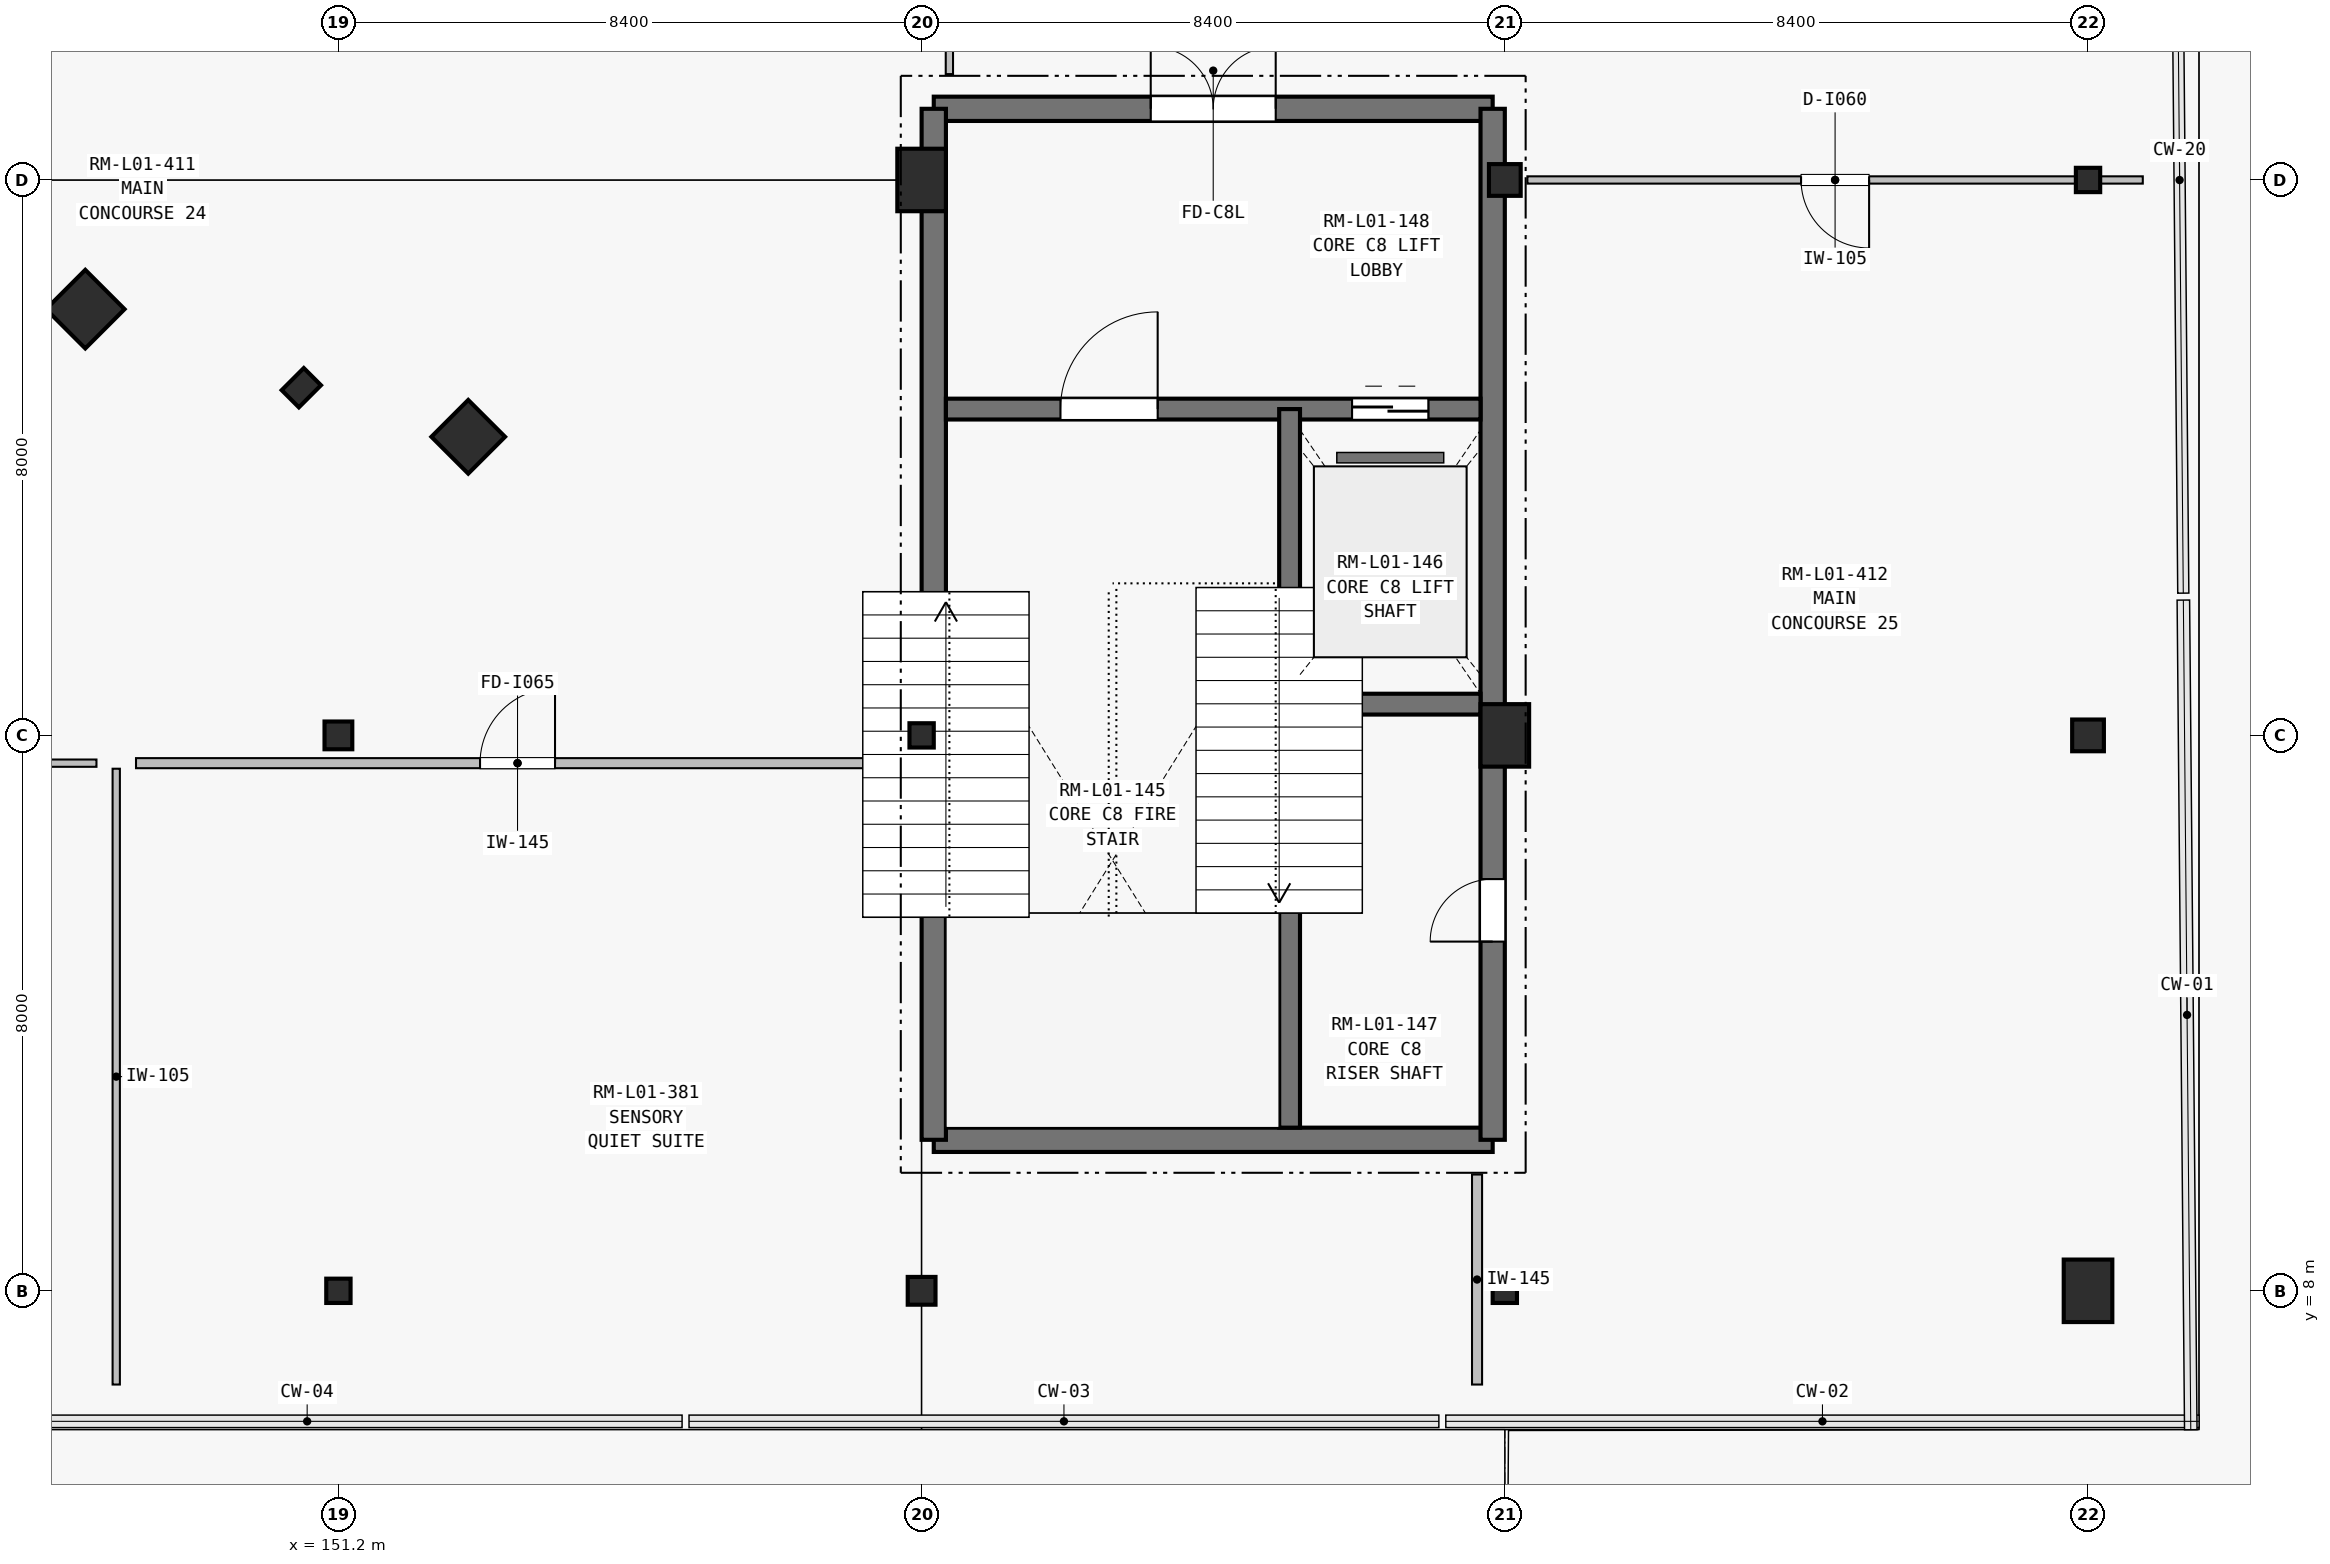
"""IFC4 building model, lengths in metres.
Left out: names, types, materials, properties, quantities, classifications, styles, units other than length and angle.
Written with IfcOpenShell. Run it as: python <this file> out.ifc"""

import sys

from ifc_helpers import new_model, si_unit, direction, frame, frame_2d, origin, origin_2d, place, context, subcontext, project, spatial, rectangle, hollow_rectangle, hollow_circle, i_section, extrude, element, fill, save


model = new_model("IFC4")
c1 = context("Model", 3, precision=1e-05, world=origin(), true_north=direction((0.0, 1.0)))
c2 = subcontext(c1, "Body", "Model", "MODEL_VIEW")
j1 = project(units=[si_unit("LENGTHUNIT", "METRE"), si_unit("PLANEANGLEUNIT", "RADIAN")], contexts=[c1])
p1 = place(None, origin())
s1 = spatial("IfcSite", under=j1, at=p1, CompositionType="ELEMENT")
p2 = place(p1, origin())
s2 = spatial("IfcBuilding", under=s1, at=p2, CompositionType="ELEMENT")
p3 = place(p2, frame((0.0, 0.0, 5.4)))
s3 = spatial("IfcBuildingStorey", under=s2, at=p3, CompositionType="ELEMENT", Elevation=5.4)
p4 = place(p3, frame((147.554, 22.139, 0.0), z_axis=(0.0, 0.0, 1.0), x_axis=(0.707106781187, -0.707106781187, 0.0)))
e1 = element("IfcColumn", 1, at=p4, inside=s3, PredefinedType="COLUMN", context=c2, shape_type="SweptSolid", body=[
    extrude(rectangle(XDim=0.8, YDim=0.8, at=origin_2d()), origin(), (0.0, 0.0, 1.0), 4.5),
])
p5 = place(p3, frame((153.07, 20.301, 0.0), z_axis=(0.0, 0.0, 1.0), x_axis=(0.707106781187, -0.707106781187, 0.0)))
e2 = element("IfcColumn", 2, at=p5, inside=s3, PredefinedType="COLUMN", context=c2, shape_type="SweptSolid", body=[
    extrude(rectangle(XDim=0.75, YDim=0.75, at=origin_2d()), origin(), (0.0, 0.0, 1.0), 4.2),
])
p6 = place(p3, frame((151.2, 8.0, 0.0), z_axis=(0.0, 0.0, 1.0), x_axis=(1.0, 0.0, 0.0)))
e3 = element("IfcColumn", 3, at=p6, inside=s3, PredefinedType="COLUMN", context=c2, shape_type="SweptSolid", body=[
    extrude(hollow_rectangle(XDim=0.35, YDim=0.35, WallThickness=0.016, at=origin_2d()), origin(), (0.0, 0.0, 1.0), 4.5),
])
for number, where, z_axis, x_axis in (
    (4, (151.2, 16.0, 0.0), (0.0, 0.0, 1.0), (1.0, 0.0, 0.0)),
    (5, (159.6, 8.0, 0.0), (0.0, 0.0, 1.0), (1.0, 0.0, 0.0)),
):
    element("IfcColumn", number, at=place(p3, frame(where, z_axis=z_axis, x_axis=x_axis)), inside=s3, PredefinedType="COLUMN", context=c2, shape_type="SweptSolid", body=[
        extrude(i_section(OverallWidth=0.4, OverallDepth=0.4, WebThickness=0.016, FlangeThickness=0.028, at=origin_2d()), origin(), (0.0, 0.0, 1.0), 4.5),
    ])
p7 = place(p3, frame((159.6, 16.0, 0.0), z_axis=(0.0, 0.0, 1.0), x_axis=(1.0, 0.0, 0.0)))
e6 = element("IfcColumn", 6, at=p7, inside=s3, PredefinedType="COLUMN", context=c2, shape_type="SweptSolid", body=[
    extrude(i_section(OverallWidth=0.35, OverallDepth=0.35, WebThickness=0.014, FlangeThickness=0.024, at=origin_2d()), origin(), (0.0, 0.0, 1.0), 4.5),
])
p8 = place(p3, frame((159.6, 24.0, 0.0), z_axis=(0.0, 0.0, 1.0), x_axis=(1.0, 0.0, 0.0)))
e7 = element("IfcColumn", 7, at=p8, inside=s3, PredefinedType="COLUMN", context=c2, shape_type="SweptSolid", body=[
    extrude(rectangle(XDim=0.7, YDim=0.9, at=origin_2d()), origin(), (0.0, 0.0, 1.0), 4.5),
])
p9 = place(p3, frame((168.0, 8.0, 0.0), z_axis=(0.0, 0.0, 1.0), x_axis=(1.0, 0.0, 0.0)))
e8 = element("IfcColumn", 8, at=p9, inside=s3, PredefinedType="COLUMN", context=c2, shape_type="SweptSolid", body=[
    extrude(i_section(OverallWidth=0.35, OverallDepth=0.35, WebThickness=0.014, FlangeThickness=0.024, at=origin_2d()), origin(), (0.0, 0.0, 1.0), 4.5),
])
p10 = place(p3, frame((168.0, 16.0, 0.0), z_axis=(0.0, 0.0, 1.0), x_axis=(1.0, 0.0, 0.0)))
e9 = element("IfcColumn", 9, at=p10, inside=s3, PredefinedType="COLUMN", context=c2, shape_type="SweptSolid", body=[
    extrude(rectangle(XDim=0.7, YDim=0.9, at=origin_2d()), origin(), (0.0, 0.0, 1.0), 4.5),
])
p11 = place(p3, frame((168.0, 24.0, 0.0), z_axis=(0.0, 0.0, 1.0), x_axis=(1.0, 0.0, 0.0)))
e10 = element("IfcColumn", 10, at=p11, inside=s3, PredefinedType="COLUMN", context=c2, shape_type="SweptSolid", body=[
    extrude(hollow_circle(Radius=0.229, WallThickness=0.016, at=origin_2d()), origin(), (0.0, 0.0, 1.0), 4.5),
])
p12 = place(p3, frame((176.4, 8.0, 0.0), z_axis=(0.0, 0.0, 1.0), x_axis=(1.0, 0.0, 0.0)))
e11 = element("IfcColumn", 11, at=p12, inside=s3, PredefinedType="COLUMN", context=c2, shape_type="SweptSolid", body=[
    extrude(rectangle(XDim=0.7, YDim=0.9, at=origin_2d()), origin(), (0.0, 0.0, 1.0), 4.26),
])
p13 = place(p3, frame((176.4, 16.0, 0.0), z_axis=(0.0, 0.0, 1.0), x_axis=(1.0, 0.0, 0.0)))
e12 = element("IfcColumn", 12, at=p13, inside=s3, PredefinedType="COLUMN", context=c2, shape_type="SweptSolid", body=[
    extrude(hollow_circle(Radius=0.229, WallThickness=0.016, at=origin_2d()), origin(), (0.0, 0.0, 1.0), 4.26),
])
p14 = place(p3, frame((176.4, 24.0, 0.0), z_axis=(0.0, 0.0, 1.0), x_axis=(1.0, 0.0, 0.0)))
e13 = element("IfcColumn", 13, at=p14, inside=s3, PredefinedType="COLUMN", context=c2, shape_type="SweptSolid", body=[
    extrude(hollow_rectangle(XDim=0.35, YDim=0.35, WallThickness=0.016, at=origin_2d()), origin(), (0.0, 0.0, 1.0), 4.26),
])
p15 = place(p3, frame((150.666, 21.008, 0.0), z_axis=(0.0, 0.0, 1.0), x_axis=(0.707106781187, -0.707106781187, 0.0)))
e14 = element("IfcColumn", 14, at=p15, inside=s3, PredefinedType="PILASTER", context=c2, shape_type="SweptSolid", body=[
    extrude(rectangle(XDim=0.35, YDim=0.45, at=origin_2d()), origin(), (0.0, 0.0, 1.0), 4.5),
])
p16 = place(p3, frame((159.775, 10.175, 0.0), z_axis=(0.0, 0.0, 1.0), x_axis=(1.0, 0.0, 0.0)))
e15 = element("IfcWall", 15, at=p16, inside=s3, PredefinedType="SHEAR", context=c2, shape_type="SweptSolid", body=[
    extrude(rectangle(XDim=8.05, YDim=0.35, at=frame_2d((4.025, 0.0))), origin(), (0.0, 0.0, 1.0), 4.5),
])
p17 = place(p3, frame((159.775, 25.025, 0.0), z_axis=(0.0, 0.0, 1.0), x_axis=(1.0, 0.0, 0.0)))
e16 = element("IfcWall", 16, at=p17, inside=s3, PredefinedType="SHEAR", context=c2, shape_type="SweptSolid", body=[
    extrude(rectangle(XDim=8.05, YDim=0.35, at=frame_2d((4.025, 0.0))), origin(), (0.0, 0.0, 1.0), 4.5),
])
p18 = place(p17, frame((3.125, 0.0, 0.0)))
e17 = element("IfcOpeningElement", 17, at=p18, cuts=e16, PredefinedType="OPENING", context=c2, shape_type="SweptSolid", body=[
    extrude(rectangle(XDim=1.8, YDim=2.25, at=frame_2d((0.9, 1.125))), frame((0.0, 0.185, 0.0), z_axis=(0.0, -1.0, 0.0), x_axis=(1.0, 0.0, 0.0)), (0.0, 0.0, 1.0), 0.37),
])
p19 = place(p3, frame((159.775, 10.175, 0.0), z_axis=(0.0, 0.0, 1.0), x_axis=(0.0, 1.0, 0.0)))
e18 = element("IfcWall", 18, at=p19, inside=s3, PredefinedType="SHEAR", context=c2, shape_type="SweptSolid", body=[
    extrude(rectangle(XDim=14.85, YDim=0.35, at=frame_2d((7.425, 0.0))), origin(), (0.0, 0.0, 1.0), 4.5),
])
p20 = place(p3, frame((167.825, 10.175, 0.0), z_axis=(0.0, 0.0, 1.0), x_axis=(0.0, 1.0, 0.0)))
e19 = element("IfcWall", 19, at=p20, inside=s3, PredefinedType="SHEAR", context=c2, shape_type="SweptSolid", body=[
    extrude(rectangle(XDim=14.85, YDim=0.35, at=frame_2d((7.425, 0.0))), origin(), (0.0, 0.0, 1.0), 4.5),
])
p21 = place(p20, frame((2.855, 0.0, 0.0)))
e20 = element("IfcOpeningElement", 20, at=p21, cuts=e19, PredefinedType="OPENING", context=c2, shape_type="SweptSolid", body=[
    extrude(rectangle(XDim=0.9, YDim=2.1, at=frame_2d((0.45, 1.05))), frame((0.0, 0.185, 0.0), z_axis=(0.0, -1.0, 0.0), x_axis=(1.0, 0.0, 0.0)), (0.0, 0.0, 1.0), 0.37),
])
p22 = place(p3, frame((159.95, 20.7, 0.0), z_axis=(0.0, 0.0, 1.0), x_axis=(1.0, 0.0, 0.0)))
e21 = element("IfcWall", 21, at=p22, inside=s3, PredefinedType="SHEAR", context=c2, shape_type="SweptSolid", body=[
    extrude(rectangle(XDim=7.7, YDim=0.3, at=frame_2d((3.85, 0.0))), origin(), (0.0, 0.0, 1.0), 4.5),
])
p23 = place(p22, frame((1.65, 0.0, 0.0)))
e22 = element("IfcOpeningElement", 22, at=p23, cuts=e21, PredefinedType="OPENING", context=c2, shape_type="SweptSolid", body=[
    extrude(rectangle(XDim=1.4, YDim=2.2, at=frame_2d((0.7, 1.1))), frame((0.0, 0.16, 0.0), z_axis=(0.0, -1.0, 0.0), x_axis=(1.0, 0.0, 0.0)), (0.0, 0.0, 1.0), 0.32),
])
p24 = place(p22, frame((5.85, 0.0, 0.0)))
e23 = element("IfcOpeningElement", 23, at=p24, cuts=e21, PredefinedType="OPENING", context=c2, shape_type="SweptSolid", body=[
    extrude(rectangle(XDim=1.1, YDim=2.2, at=frame_2d((0.55, 1.1))), frame((0.0, 0.16, 0.0), z_axis=(0.0, -1.0, 0.0), x_axis=(1.0, 0.0, 0.0)), (0.0, 0.0, 1.0), 0.32),
])
p25 = place(p3, frame((164.9, 10.35, 0.0), z_axis=(0.0, 0.0, 1.0), x_axis=(0.0, 1.0, 0.0)))
e24 = element("IfcWall", 24, at=p25, inside=s3, PredefinedType="SHEAR", context=c2, shape_type="SweptSolid", body=[
    extrude(rectangle(XDim=10.35, YDim=0.3, at=frame_2d((5.175, 0.0))), origin(), (0.0, 0.0, 1.0), 4.5),
])
p26 = place(p3, frame((165.05, 16.45, 0.0), z_axis=(0.0, 0.0, 1.0), x_axis=(1.0, 0.0, 0.0)))
e25 = element("IfcWall", 25, at=p26, inside=s3, PredefinedType="SHEAR", context=c2, shape_type="SweptSolid", body=[
    extrude(rectangle(XDim=2.6, YDim=0.3, at=frame_2d((1.3, 0.0))), origin(), (0.0, 0.0, 1.0), 4.5),
])
p27 = place(p3, frame((177.189, 24.0, 0.0), z_axis=(0.0, 0.0, 1.0), x_axis=(-1.0, 0.0, 0.0)))
e26 = element("IfcWall", 26, at=p27, inside=s3, PredefinedType="PARTITIONING", context=c2, shape_type="SweptSolid", body=[
    extrude(rectangle(XDim=8.864, YDim=0.105, at=frame_2d((4.432, 0.0))), origin(), (0.0, 0.0, 1.0), 3.573),
])
p28 = place(p27, frame((3.942, 0.0, 0.0)))
e27 = element("IfcOpeningElement", 27, at=p28, cuts=e26, PredefinedType="OPENING", context=c2, shape_type="SweptSolid", body=[
    extrude(rectangle(XDim=0.98, YDim=2.15, at=frame_2d((0.49, 1.075))), frame((0.0, 0.062, 0.0), z_axis=(0.0, -1.0, 0.0), x_axis=(1.0, 0.0, 0.0)), (0.0, 0.0, 1.0), 0.125),
])
p29 = place(p3, frame((160.0, 25.525, 0.0), z_axis=(0.0, 0.0, 1.0), x_axis=(0.0, 1.0, 0.0)))
e28 = element("IfcWall", 28, at=p29, inside=s3, PredefinedType="PARTITIONING", context=c2, shape_type="SweptSolid", body=[
    extrude(rectangle(XDim=7.35, YDim=0.105, at=frame_2d((3.675, 0.0))), origin(), (0.0, 0.0, 1.0), 4.2),
])
p30 = place(p3, frame((148.0, 15.52, 0.0), z_axis=(0.0, 0.0, 1.0), x_axis=(0.0, -1.0, 0.0)))
e29 = element("IfcWall", 29, at=p30, inside=s3, PredefinedType="PARTITIONING", context=c2, shape_type="SweptSolid", body=[
    extrude(rectangle(XDim=8.87, YDim=0.105, at=frame_2d((4.435, 0.0))), origin(), (0.0, 0.0, 1.0), 3.475),
])
p31 = place(p3, frame((118.285, 15.6, 0.0), z_axis=(0.0, 0.0, 1.0), x_axis=(1.0, 0.0, 0.0)))
e30 = element("IfcWall", 30, at=p31, inside=s3, PredefinedType="PARTITIONING", context=c2, shape_type="SweptSolid", body=[
    extrude(rectangle(XDim=29.43, YDim=0.105, at=frame_2d((14.715, 0.0))), origin(), (0.0, 0.0, 1.0), 3.475),
])
p32 = place(p31, frame((14.225, 0.0, 0.0)))
e31 = element("IfcOpeningElement", 31, at=p32, cuts=e30, PredefinedType="OPENING", context=c2, shape_type="SweptSolid", body=[
    extrude(rectangle(XDim=0.98, YDim=2.15, at=frame_2d((0.49, 1.075))), frame((0.0, 0.062, 0.0), z_axis=(0.0, -1.0, 0.0), x_axis=(1.0, 0.0, 0.0)), (0.0, 0.0, 1.0), 0.125),
])
p33 = place(p3, frame((167.6, 9.675, 0.0), z_axis=(0.0, 0.0, 1.0), x_axis=(0.0, -1.0, 0.0)))
e32 = element("IfcWall", 32, at=p33, inside=s3, PredefinedType="PARTITIONING", context=c2, shape_type="SweptSolid", body=[
    extrude(rectangle(XDim=3.025, YDim=0.145, at=frame_2d((1.513, 0.0))), origin(), (0.0, 0.0, 1.0), 3.475),
])
p34 = place(p3, frame((148.285, 15.6, 0.0), z_axis=(0.0, 0.0, 1.0), x_axis=(1.0, 0.0, 0.0)))
e33 = element("IfcWall", 33, at=p34, inside=s3, PredefinedType="PARTITIONING", context=c2, shape_type="SweptSolid", body=[
    extrude(rectangle(XDim=10.99, YDim=0.145, at=frame_2d((5.495, 0.0))), origin(), (0.0, 0.0, 1.0), 3.642),
])
p35 = place(p34, frame((4.955, 0.0, 0.0)))
e34 = element("IfcOpeningElement", 34, at=p35, cuts=e33, PredefinedType="OPENING", context=c2, shape_type="SweptSolid", body=[
    extrude(rectangle(XDim=1.08, YDim=2.15, at=frame_2d((0.54, 1.075))), frame((0.0, 0.083, 0.0), z_axis=(0.0, -1.0, 0.0), x_axis=(1.0, 0.0, 0.0)), (0.0, 0.0, 1.0), 0.165),
])
p36 = place(p18, origin())
e35 = element("IfcDoor", 35, at=p36, inside=s3, OperationType="DOUBLE_DOOR_SINGLE_SWING", PredefinedType="DOOR", context=c2, shape_type="SweptSolid", body=[
    extrude(rectangle(XDim=1.8, YDim=2.25, at=frame_2d((0.9, 1.125))), frame((0.0, 0.025, 0.0), z_axis=(0.0, -1.0, 0.0), x_axis=(1.0, 0.0, 0.0)), (0.0, 0.0, 1.0), 0.05),
])
fill(e17, e35)
p37 = place(p23, origin())
e36 = element("IfcDoor", 36, at=p37, inside=s3, OperationType="SINGLE_SWING_RIGHT", PredefinedType="DOOR", context=c2, shape_type="SweptSolid", body=[
    extrude(rectangle(XDim=1.4, YDim=2.2, at=frame_2d((0.7, 1.1))), frame((0.0, 0.025, 0.0), z_axis=(0.0, -1.0, 0.0), x_axis=(1.0, 0.0, 0.0)), (0.0, 0.0, 1.0), 0.05),
])
fill(e22, e36)
p38 = place(p21, origin())
e37 = element("IfcDoor", 37, at=p38, inside=s3, OperationType="SINGLE_SWING_LEFT", PredefinedType="DOOR", context=c2, shape_type="SweptSolid", body=[
    extrude(rectangle(XDim=0.9, YDim=2.1, at=frame_2d((0.45, 1.05))), frame((0.0, 0.025, 0.0), z_axis=(0.0, -1.0, 0.0), x_axis=(1.0, 0.0, 0.0)), (0.0, 0.0, 1.0), 0.05),
])
fill(e20, e37)
p39 = place(p24, origin())
e38 = element("IfcDoor", 38, at=p39, inside=s3, OperationType="SLIDING_TO_LEFT", PredefinedType="DOOR", context=c2, shape_type="SweptSolid", body=[
    extrude(rectangle(XDim=1.1, YDim=2.2, at=frame_2d((0.55, 1.1))), frame((0.0, 0.025, 0.0), z_axis=(0.0, -1.0, 0.0), x_axis=(1.0, 0.0, 0.0)), (0.0, 0.0, 1.0), 0.05),
])
fill(e23, e38)
p40 = place(p28, origin())
e39 = element("IfcDoor", 39, at=p40, inside=s3, OperationType="SINGLE_SWING_LEFT", PredefinedType="DOOR", context=c2, shape_type="SweptSolid", body=[
    extrude(rectangle(XDim=0.98, YDim=2.15, at=frame_2d((0.49, 1.075))), frame((0.0, 0.025, 0.0), z_axis=(0.0, -1.0, 0.0), x_axis=(1.0, 0.0, 0.0)), (0.0, 0.0, 1.0), 0.05),
])
fill(e27, e39)
p41 = place(p35, origin())
e40 = element("IfcDoor", 40, at=p41, inside=s3, OperationType="SINGLE_SWING_RIGHT", PredefinedType="DOOR", context=c2, shape_type="SweptSolid", body=[
    extrude(rectangle(XDim=1.08, YDim=2.15, at=frame_2d((0.54, 1.075))), frame((0.0, 0.025, 0.0), z_axis=(0.0, -1.0, 0.0), x_axis=(1.0, 0.0, 0.0)), (0.0, 0.0, 1.0), 0.05),
])
fill(e34, e40)
save(model, sys.argv[1])
